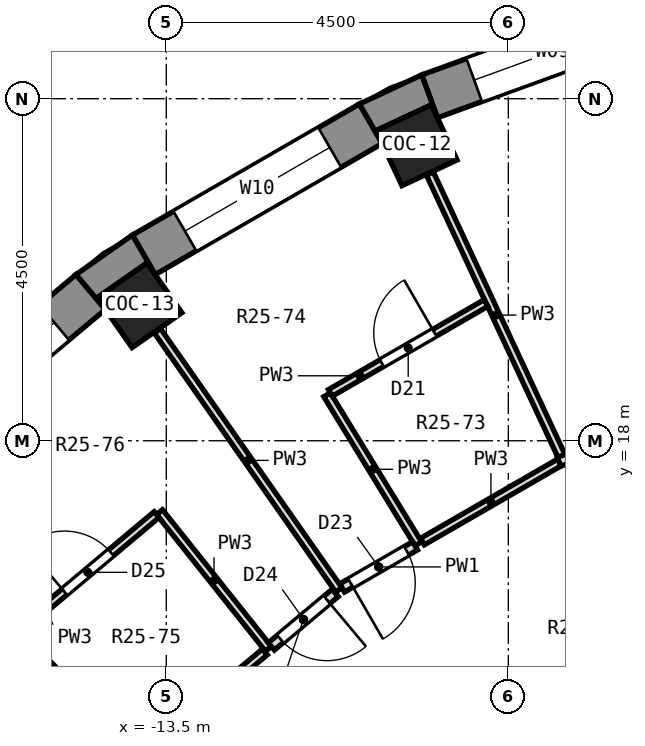
"""IFC4 building model, lengths in metres.
Left out: names, types, materials, properties, quantities, classifications, styles, units other than length and angle.
Written with IfcOpenShell. Run it as: python <this file> out.ifc"""

import sys

from ifc_helpers import new_model, si_unit, direction, frame, frame_2d, origin, origin_2d, place, context, subcontext, project, spatial, polyline, rectangle, outline, extrude, element, fill, save


model = new_model("IFC4")
c1 = context("Model", 3, precision=1e-05, world=origin(), true_north=direction((0.0, 1.0)))
c2 = subcontext(c1, "Body", "Model", "MODEL_VIEW")
j1 = project(units=[si_unit("LENGTHUNIT", "METRE"), si_unit("PLANEANGLEUNIT", "RADIAN")], contexts=[c1])
p1 = place(None, origin())
s1 = spatial("IfcSite", under=j1, at=p1, CompositionType="ELEMENT")
p2 = place(p1, origin())
s2 = spatial("IfcBuilding", under=s1, at=p2, CompositionType="ELEMENT")
p3 = place(p2, frame((0.0, 0.0, 160.8)))
s3 = spatial("IfcBuildingStorey", under=s2, at=p3, CompositionType="ELEMENT", Elevation=160.8)
for number, where, z_axis, x_axis in (
    (1, (-10.206, 21.887, 0.0), (0.0, 0.0, 1.0), (-0.423, 0.906, 0.0)),
    (2, (-13.852, 19.782, 0.0), (0.0, 0.0, 1.0), (-0.574, 0.819, 0.0)),
):
    element("IfcColumn", number, at=place(p3, frame(where, z_axis=z_axis, x_axis=x_axis)), inside=s3, PredefinedType="COLUMN", context=c2, shape_type="SweptSolid", body=[
        extrude(rectangle(XDim=0.8, YDim=0.8, at=origin_2d()), origin(), (0.0, 0.0, 1.0), 3.3),
    ])
p4 = place(p3, frame((-6.794, 23.711, 0.0), z_axis=(0.0, 0.0, 1.0), x_axis=(-0.93968799822, -0.342032843455, 0.0)))
e3 = element("IfcWall", 3, at=p4, inside=s3, PredefinedType="SOLIDWALL", context=c2, shape_type="SweptSolid", body=[
    extrude(rectangle(XDim=3.45, YDim=0.6, at=frame_2d((1.725, 0.0))), origin(), (0.0, 0.0, 1.0), 2.85),
])
p5 = place(p4, frame((0.625, 0.0, 0.9)))
e4 = element("IfcOpeningElement", 4, at=p5, cuts=e3, PredefinedType="OPENING", context=c2, shape_type="SweptSolid", body=[
    extrude(rectangle(XDim=2.2, YDim=1.8, at=frame_2d((1.1, 0.9))), frame((0.0, 0.312, 0.0), z_axis=(0.0, -1.0, 0.0), x_axis=(1.0, 0.0, 0.0)), (0.0, 0.0, 1.0), 0.624),
])
p6 = place(p3, frame((-10.809, 22.171, 0.0), z_axis=(0.0, 0.0, 1.0), x_axis=(-0.86602648383, -0.499998129301, 0.0)))
e5 = element("IfcWall", 5, at=p6, inside=s3, PredefinedType="SOLIDWALL", context=c2, shape_type="SweptSolid", body=[
    extrude(rectangle(XDim=3.45, YDim=0.6, at=frame_2d((1.725, 0.0))), origin(), (0.0, 0.0, 1.0), 2.85),
])
p7 = place(p6, frame((0.625, 0.0, 0.9)))
e6 = element("IfcOpeningElement", 6, at=p7, cuts=e5, PredefinedType="OPENING", context=c2, shape_type="SweptSolid", body=[
    extrude(rectangle(XDim=2.2, YDim=1.8, at=frame_2d((1.1, 0.9))), frame((0.0, 0.312, 0.0), z_axis=(0.0, -1.0, 0.0), x_axis=(1.0, 0.0, 0.0)), (0.0, 0.0, 1.0), 0.624),
])
p8 = place(p3, frame((-14.494, 19.957, 0.0), z_axis=(0.0, 0.0, 1.0), x_axis=(-0.766058884809, -0.642770398358, 0.0)))
e7 = element("IfcWall", 7, at=p8, inside=s3, PredefinedType="SOLIDWALL", context=c2, shape_type="SweptSolid", body=[
    extrude(rectangle(XDim=3.449, YDim=0.6, at=frame_2d((1.725, 0.0))), origin(), (0.0, 0.0, 1.0), 2.85),
])
p9 = place(p8, frame((0.625, 0.0, 0.9)))
e8 = element("IfcOpeningElement", 8, at=p9, cuts=e7, PredefinedType="OPENING", context=c2, shape_type="SweptSolid", body=[
    extrude(rectangle(XDim=2.2, YDim=1.8, at=frame_2d((1.1, 0.9))), frame((0.0, 0.312, 0.0), z_axis=(0.0, -1.0, 0.0), x_axis=(1.0, 0.0, 0.0)), (0.0, 0.0, 1.0), 0.624),
])
p10 = place(p3, origin())
e9 = element("IfcWall", 9, at=p10, inside=s3, PredefinedType="SOLIDWALL", context=c2, shape_type="SweptSolid", body=[
    extrude(outline(polyline([(-10.959, 22.431), (-10.659, 21.911), (-10.738, 22.081), (-10.013, 22.419), (-9.934, 22.249), (-10.139, 22.813), (-10.959, 22.431)])), origin(), (0.0, 0.0, 1.0), 2.85),
])
p11 = place(p3, origin())
e10 = element("IfcWall", 10, at=p11, inside=s3, PredefinedType="SOLIDWALL", context=c2, shape_type="SweptSolid", body=[
    extrude(outline(polyline([(-13.946, 20.706), (-14.687, 20.187), (-14.302, 19.727), (-14.409, 19.881), (-13.754, 20.34), (-13.646, 20.186), (-13.946, 20.706)])), origin(), (0.0, 0.0, 1.0), 2.85),
])
p12 = place(p3, frame((-10.032, 21.516, 0.0), z_axis=(0.0, 0.0, 1.0), x_axis=(0.422407439585, -0.906406065173, 0.0)))
e11 = element("IfcWall", 11, at=p12, inside=s3, PredefinedType="PARTITIONING", context=c2, shape_type="SweptSolid", body=[
    extrude(rectangle(XDim=4.111, YDim=0.1, at=frame_2d((2.055, 0.0))), origin(), (0.0, 0.0, 1.0), 2.85),
])
p13 = place(p3, frame((-11.385, 18.605, 0.0), z_axis=(0.0, 0.0, 1.0), x_axis=(0.522076659847, -0.852898564451, 0.0)))
e12 = element("IfcWall", 12, at=p13, inside=s3, PredefinedType="PARTITIONING", context=c2, shape_type="SweptSolid", body=[
    extrude(rectangle(XDim=2.3, YDim=0.1, at=frame_2d((1.15, 0.0))), origin(), (0.0, 0.0, 1.0), 2.85),
])
p14 = place(p3, frame((-13.617, 19.447, 0.0), z_axis=(0.0, 0.0, 1.0), x_axis=(0.573631652668, -0.819113378634, 0.0)))
e13 = element("IfcWall", 13, at=p14, inside=s3, PredefinedType="PARTITIONING", context=c2, shape_type="SweptSolid", body=[
    extrude(rectangle(XDim=4.161, YDim=0.1, at=frame_2d((2.081, 0.0))), origin(), (0.0, 0.0, 1.0), 2.85),
])
p15 = place(p3, frame((-13.589, 17.061, 0.0), z_axis=(0.0, 0.0, 1.0), x_axis=(0.623062698495, -0.782171895266, 0.0)))
e14 = element("IfcWall", 14, at=p15, inside=s3, PredefinedType="PARTITIONING", context=c2, shape_type="SweptSolid", body=[
    extrude(rectangle(XDim=2.3, YDim=0.1, at=frame_2d((1.15, 0.0))), origin(), (0.0, 0.0, 1.0), 2.85),
])
p16 = place(p3, frame((-15.512, 15.512, 0.0), z_axis=(0.0, 0.0, 1.0), x_axis=(0.707106781187, -0.707106781187, 0.0)))
e15 = element("IfcWall", 15, at=p16, inside=s3, PredefinedType="PARTITIONING", context=c2, shape_type="SweptSolid", body=[
    extrude(rectangle(XDim=5.931, YDim=0.1, at=frame_2d((2.966, 0.0))), origin(), (0.0, 0.0, 1.0), 2.85),
])
p17 = place(p16, frame((2.617, 0.0, 0.0)))
e16 = element("IfcOpeningElement", 16, at=p17, cuts=e15, PredefinedType="OPENING", context=c2, shape_type="SweptSolid", body=[
    extrude(rectangle(XDim=0.9, YDim=2.1, at=frame_2d((0.45, 1.05))), frame((0.0, 0.062, 0.0), z_axis=(0.0, -1.0, 0.0), x_axis=(1.0, 0.0, 0.0)), (0.0, 0.0, 1.0), 0.124),
])
p18 = place(p3, frame((-8.335, 17.723, 0.0), z_axis=(0.0, 0.0, 1.0), x_axis=(0.939542594009, 0.342432057556, 0.0)))
e17 = element("IfcWall", 17, at=p18, inside=s3, PredefinedType="PARTITIONING", context=c2, shape_type="SweptSolid", body=[
    extrude(rectangle(XDim=3.414, YDim=0.125, at=frame_2d((1.707, 0.0))), origin(), (0.0, 0.0, 1.0), 2.85),
])
p19 = place(p3, frame((-11.336, 11.238, 0.0), z_axis=(0.0, 0.0, 1.0), x_axis=(0.866067506982, 0.499927068031, 0.0)))
e18 = element("IfcWall", 18, at=p19, inside=s3, PredefinedType="PARTITIONING", context=c2, shape_type="SweptSolid", body=[
    extrude(rectangle(XDim=8.263, YDim=0.125, at=frame_2d((4.131, 0.0))), origin(), (0.0, 0.0, 1.0), 2.85),
])
p20 = place(p3, frame((-11.187, 16.063, 0.0), z_axis=(0.0, 0.0, 1.0), x_axis=(0.865888396158, 0.500237229121, 0.0)))
e19 = element("IfcWall", 19, at=p20, inside=s3, PredefinedType="PARTITIONING", context=c2, shape_type="SweptSolid", body=[
    extrude(rectangle(XDim=1.108, YDim=0.125, at=frame_2d((0.554, 0.0))), origin(), (0.0, 0.0, 1.0), 2.85),
])
p21 = place(p20, frame((0.129, 0.0, 0.0)))
e20 = element("IfcOpeningElement", 20, at=p21, cuts=e19, PredefinedType="OPENING", context=c2, shape_type="SweptSolid", body=[
    extrude(rectangle(XDim=0.85, YDim=2.1, at=frame_2d((0.425, 1.05))), frame((0.0, 0.074, 0.0), z_axis=(0.0, -1.0, 0.0), x_axis=(1.0, 0.0, 0.0)), (0.0, 0.0, 1.0), 0.149),
])
p22 = place(p3, frame((-10.13, 16.674, 0.0), z_axis=(0.0, 0.0, 1.0), x_axis=(0.866052632827, 0.499952834948, 0.0)))
e21 = element("IfcWall", 21, at=p22, inside=s3, PredefinedType="PARTITIONING", context=c2, shape_type="SweptSolid", body=[
    extrude(rectangle(XDim=2.079, YDim=0.1, at=frame_2d((1.04, 0.0))), origin(), (0.0, 0.0, 1.0), 2.85),
])
p23 = place(p3, frame((-11.342, 18.63, 0.0), z_axis=(0.0, 0.0, 1.0), x_axis=(0.866139183788, 0.49980287545, 0.0)))
e22 = element("IfcWall", 22, at=p23, inside=s3, PredefinedType="PARTITIONING", context=c2, shape_type="SweptSolid", body=[
    extrude(rectangle(XDim=2.365, YDim=0.1, at=frame_2d((1.183, 0.0))), origin(), (0.0, 0.0, 1.0), 2.85),
])
p24 = place(p23, frame((0.782, 0.0, 0.0)))
e23 = element("IfcOpeningElement", 23, at=p24, cuts=e22, PredefinedType="OPENING", context=c2, shape_type="SweptSolid", body=[
    extrude(rectangle(XDim=0.8, YDim=2.1, at=frame_2d((0.4, 1.05))), frame((0.0, 0.062, 0.0), z_axis=(0.0, -1.0, 0.0), x_axis=(1.0, 0.0, 0.0)), (0.0, 0.0, 1.0), 0.124),
])
p25 = place(p3, frame((-12.118, 15.294, 0.0), z_axis=(0.0, 0.0, 1.0), x_axis=(0.766831623153, 0.641848316764, 0.0)))
e24 = element("IfcWall", 24, at=p25, inside=s3, PredefinedType="PARTITIONING", context=c2, shape_type="SweptSolid", body=[
    extrude(rectangle(XDim=1.096, YDim=0.125, at=frame_2d((0.548, 0.0))), origin(), (0.0, 0.0, 1.0), 2.85),
])
p26 = place(p25, frame((0.154, 0.0, 0.0)))
e25 = element("IfcOpeningElement", 25, at=p26, cuts=e24, PredefinedType="OPENING", context=c2, shape_type="SweptSolid", body=[
    extrude(rectangle(XDim=0.8, YDim=2.1, at=frame_2d((0.4, 1.05))), frame((0.0, 0.074, 0.0), z_axis=(0.0, -1.0, 0.0), x_axis=(1.0, 0.0, 0.0)), (0.0, 0.0, 1.0), 0.149),
])
p27 = place(p3, frame((-13.806, 13.877, 0.0), z_axis=(0.0, 0.0, 1.0), x_axis=(0.766093288455, 0.64272939359, 0.0)))
e26 = element("IfcWall", 26, at=p27, inside=s3, PredefinedType="PARTITIONING", context=c2, shape_type="SweptSolid", body=[
    extrude(rectangle(XDim=2.092, YDim=0.1, at=frame_2d((1.046, 0.0))), origin(), (0.0, 0.0, 1.0), 2.85),
])
p28 = place(p3, frame((-15.438, 15.51, 0.0), z_axis=(0.0, 0.0, 1.0), x_axis=(0.766091436164, 0.642731601399, 0.0)))
e27 = element("IfcWall", 27, at=p28, inside=s3, PredefinedType="PARTITIONING", context=c2, shape_type="SweptSolid", body=[
    extrude(rectangle(XDim=2.363, YDim=0.1, at=frame_2d((1.182, 0.0))), origin(), (0.0, 0.0, 1.0), 2.85),
])
p29 = place(p28, frame((0.781, 0.0, 0.0)))
e28 = element("IfcOpeningElement", 28, at=p29, cuts=e27, PredefinedType="OPENING", context=c2, shape_type="SweptSolid", body=[
    extrude(rectangle(XDim=0.8, YDim=2.1, at=frame_2d((0.4, 1.05))), frame((0.0, 0.062, 0.0), z_axis=(0.0, -1.0, 0.0), x_axis=(1.0, 0.0, 0.0)), (0.0, 0.0, 1.0), 0.124),
])
p30 = place(p5, origin())
e29 = element("IfcWindow", 29, at=p30, inside=s3, PartitioningType="SINGLE_PANEL", PredefinedType="WINDOW", context=c2, shape_type="SweptSolid", body=[
    extrude(rectangle(XDim=2.2, YDim=1.8, at=frame_2d((1.1, 0.9))), frame((0.0, 0.18, 0.0), z_axis=(0.0, -1.0, 0.0), x_axis=(1.0, 0.0, 0.0)), (0.0, 0.0, 1.0), 0.06),
])
fill(e4, e29)
p31 = place(p7, origin())
e30 = element("IfcWindow", 30, at=p31, inside=s3, PartitioningType="SINGLE_PANEL", PredefinedType="WINDOW", context=c2, shape_type="SweptSolid", body=[
    extrude(rectangle(XDim=2.2, YDim=1.8, at=frame_2d((1.1, 0.9))), frame((0.0, 0.18, 0.0), z_axis=(0.0, -1.0, 0.0), x_axis=(1.0, 0.0, 0.0)), (0.0, 0.0, 1.0), 0.06),
])
fill(e6, e30)
p32 = place(p9, origin())
e31 = element("IfcWindow", 31, at=p32, inside=s3, PartitioningType="SINGLE_PANEL", PredefinedType="WINDOW", context=c2, shape_type="SweptSolid", body=[
    extrude(rectangle(XDim=2.2, YDim=1.8, at=frame_2d((1.1, 0.9))), frame((0.0, 0.18, 0.0), z_axis=(0.0, -1.0, 0.0), x_axis=(1.0, 0.0, 0.0)), (0.0, 0.0, 1.0), 0.06),
])
fill(e8, e31)
p33 = place(p24, origin())
e32 = element("IfcDoor", 32, at=p33, inside=s3, OperationType="SINGLE_SWING_RIGHT", PredefinedType="DOOR", context=c2, shape_type="SweptSolid", body=[
    extrude(rectangle(XDim=0.8, YDim=2.1, at=frame_2d((0.4, 1.05))), frame((0.0, 0.025, 0.0), z_axis=(0.0, -1.0, 0.0), x_axis=(1.0, 0.0, 0.0)), (0.0, 0.0, 1.0), 0.05),
])
fill(e23, e32)
p34 = place(p21, frame((0.85, 0.0, 0.0), z_axis=(0.0, 0.0, 1.0), x_axis=(-1.0, 0.0, 0.0)))
e33 = element("IfcDoor", 33, at=p34, inside=s3, OperationType="SINGLE_SWING_RIGHT", PredefinedType="DOOR", context=c2, shape_type="SweptSolid", body=[
    extrude(rectangle(XDim=0.85, YDim=2.1, at=frame_2d((0.425, 1.05))), frame((0.0, 0.025, 0.0), z_axis=(0.0, -1.0, 0.0), x_axis=(1.0, 0.0, 0.0)), (0.0, 0.0, 1.0), 0.05),
])
fill(e20, e33)
p35 = place(p26, frame((0.8, 0.0, 0.0), z_axis=(0.0, 0.0, 1.0), x_axis=(-1.0, 0.0, 0.0)))
e34 = element("IfcDoor", 34, at=p35, inside=s3, OperationType="SINGLE_SWING_LEFT", PredefinedType="DOOR", context=c2, shape_type="SweptSolid", body=[
    extrude(rectangle(XDim=0.8, YDim=2.1, at=frame_2d((0.4, 1.05))), frame((0.0, 0.025, 0.0), z_axis=(0.0, -1.0, 0.0), x_axis=(1.0, 0.0, 0.0)), (0.0, 0.0, 1.0), 0.05),
])
fill(e25, e34)
p36 = place(p29, origin())
e35 = element("IfcDoor", 35, at=p36, inside=s3, OperationType="SINGLE_SWING_LEFT", PredefinedType="DOOR", context=c2, shape_type="SweptSolid", body=[
    extrude(rectangle(XDim=0.8, YDim=2.1, at=frame_2d((0.4, 1.05))), frame((0.0, 0.025, 0.0), z_axis=(0.0, -1.0, 0.0), x_axis=(1.0, 0.0, 0.0)), (0.0, 0.0, 1.0), 0.05),
])
fill(e28, e35)
save(model, sys.argv[1])
